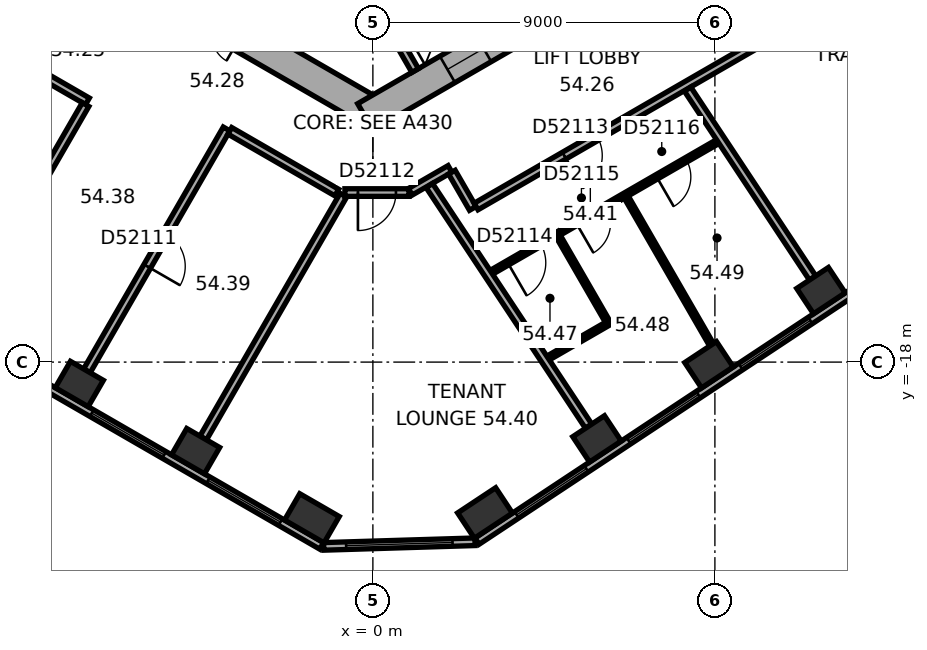
"""IFC4 building model, lengths in metres.
Left out: names, types, materials, properties, quantities, classifications, styles, units other than length and angle.
Written with IfcOpenShell. Run it as: python <this file> out.ifc"""

import sys

from ifc_helpers import new_model, si_unit, direction, frame, frame_2d, origin, origin_2d, place, context, subcontext, project, spatial, rectangle, extrude, element, fill, save


model = new_model("IFC4")
c1 = context("Model", 3, precision=1e-05, world=origin(), true_north=direction((0.0, 1.0)))
c2 = subcontext(c1, "Body", "Model", "MODEL_VIEW")
j1 = project(units=[si_unit("LENGTHUNIT", "METRE"), si_unit("PLANEANGLEUNIT", "RADIAN")], contexts=[c1])
p1 = place(None, origin())
s1 = spatial("IfcSite", under=j1, at=p1, CompositionType="ELEMENT")
p2 = place(p1, origin())
s2 = spatial("IfcBuilding", under=s1, at=p2, CompositionType="ELEMENT")
p3 = place(p2, frame((0.0, 0.0, 221.7)))
s3 = spatial("IfcBuildingStorey", under=s2, at=p3, CompositionType="ELEMENT", Elevation=221.7)
for number, where, z_axis, x_axis in (
    (1, (-7.725, -18.576, 0.0), (0.0, 0.0, 1.0), (0.866, -0.5, 0.0)),
    (2, (-4.665, -20.343, 0.0), (0.0, 0.0, 1.0), (0.866, -0.5, 0.0)),
):
    element("IfcColumn", number, at=place(p3, frame(where, z_axis=z_axis, x_axis=x_axis)), inside=s3, PredefinedType="COLUMN", context=c2, shape_type="SweptSolid", body=[
        extrude(rectangle(XDim=1.0, YDim=0.8, at=origin_2d()), origin(), (0.0, 0.0, 1.0), 3.7),
    ])
for number, where, z_axis, x_axis in (
    (3, (-1.604, -22.11, 0.0), (0.0, 0.0, 1.0), (0.866, -0.5, 0.0)),
    (4, (2.951, -21.971, 0.0), (0.0, 0.0, 1.0), (0.834, 0.552, 0.0)),
):
    element("IfcColumn", number, at=place(p3, frame(where, z_axis=z_axis, x_axis=x_axis)), inside=s3, PredefinedType="COLUMN", context=c2, shape_type="SweptSolid", body=[
        extrude(rectangle(XDim=1.2, YDim=0.8, at=origin_2d()), origin(), (0.0, 0.0, 1.0), 3.7),
    ])
for number, where, z_axis, x_axis in (
    (5, (5.898, -20.021, 0.0), (0.0, 0.0, 1.0), (0.834, 0.552, 0.0)),
    (6, (8.844, -18.07, 0.0), (0.0, 0.0, 1.0), (0.834, 0.552, 0.0)),
    (7, (11.791, -16.12, 0.0), (0.0, 0.0, 1.0), (0.834, 0.552, 0.0)),
):
    element("IfcColumn", number, at=place(p3, frame(where, z_axis=z_axis, x_axis=x_axis)), inside=s3, PredefinedType="COLUMN", context=c2, shape_type="SweptSolid", body=[
        extrude(rectangle(XDim=1.0, YDim=0.8, at=origin_2d()), origin(), (0.0, 0.0, 1.0), 3.7),
    ])
p4 = place(p3, frame((-10.1, -5.6, 0.0), z_axis=(0.0, 0.0, 1.0), x_axis=(0.866023897231, -0.500002609418, 0.0)))
e8 = element("IfcWall", 8, at=p4, inside=s3, PredefinedType="SHEAR", context=c2, shape_type="SweptSolid", body=[
    extrude(rectangle(XDim=11.894, YDim=0.8, at=frame_2d((5.947, 0.0))), origin(), (0.0, 0.0, 1.0), 3.7),
])
p5 = place(p4, frame((6.147, 0.0, 0.0)))
e9 = element("IfcOpeningElement", 9, at=p5, cuts=e8, PredefinedType="OPENING", context=c2, shape_type="SweptSolid", body=[
    extrude(rectangle(XDim=1.5, YDim=2.1, at=frame_2d((0.75, 1.05))), frame((0.0, 0.41, 0.0), z_axis=(0.0, -1.0, 0.0), x_axis=(1.0, 0.0, 0.0)), (0.0, 0.0, 1.0), 0.82),
])
p6 = place(p4, frame((1.597, 0.0, 0.0)))
e10 = element("IfcOpeningElement", 10, at=p6, cuts=e8, PredefinedType="OPENING", context=c2, shape_type="SweptSolid", body=[
    extrude(rectangle(XDim=1.1, YDim=2.1, at=frame_2d((0.55, 1.05))), frame((0.0, 0.41, 0.0), z_axis=(0.0, -1.0, 0.0), x_axis=(1.0, 0.0, 0.0)), (0.0, 0.0, 1.0), 0.82),
])
p7 = place(p4, frame((4.197, 0.0, 0.0)))
e11 = element("IfcOpeningElement", 11, at=p7, cuts=e8, PredefinedType="OPENING", context=c2, shape_type="SweptSolid", body=[
    extrude(rectangle(XDim=1.1, YDim=2.1, at=frame_2d((0.55, 1.05))), frame((0.0, 0.41, 0.0), z_axis=(0.0, -1.0, 0.0), x_axis=(1.0, 0.0, 0.0)), (0.0, 0.0, 1.0), 0.82),
])
p8 = place(p3, frame((-0.2, -11.547, 0.0), z_axis=(0.0, 0.0, 1.0), x_axis=(0.866023897231, 0.500002609418, 0.0)))
e12 = element("IfcWall", 12, at=p8, inside=s3, PredefinedType="SHEAR", context=c2, shape_type="SweptSolid", body=[
    extrude(rectangle(XDim=11.894, YDim=0.8, at=frame_2d((5.947, 0.0))), origin(), (0.0, 0.0, 1.0), 3.7),
])
p9 = place(p8, frame((2.497, 0.0, 0.0)))
e13 = element("IfcOpeningElement", 13, at=p9, cuts=e12, PredefinedType="OPENING", context=c2, shape_type="SweptSolid", body=[
    extrude(rectangle(XDim=1.1, YDim=2.1, at=frame_2d((0.55, 1.05))), frame((0.0, 0.41, 0.0), z_axis=(0.0, -1.0, 0.0), x_axis=(1.0, 0.0, 0.0)), (0.0, 0.0, 1.0), 0.82),
])
p10 = place(p8, frame((5.097, 0.0, 0.0)))
e14 = element("IfcOpeningElement", 14, at=p10, cuts=e12, PredefinedType="OPENING", context=c2, shape_type="SweptSolid", body=[
    extrude(rectangle(XDim=1.1, YDim=2.1, at=frame_2d((0.55, 1.05))), frame((0.0, 0.41, 0.0), z_axis=(0.0, -1.0, 0.0), x_axis=(1.0, 0.0, 0.0)), (0.0, 0.0, 1.0), 0.82),
])
p11 = place(p8, frame((7.697, 0.0, 0.0)))
e15 = element("IfcOpeningElement", 15, at=p11, cuts=e12, PredefinedType="OPENING", context=c2, shape_type="SweptSolid", body=[
    extrude(rectangle(XDim=1.1, YDim=2.1, at=frame_2d((0.55, 1.05))), frame((0.0, 0.41, 0.0), z_axis=(0.0, -1.0, 0.0), x_axis=(1.0, 0.0, 0.0)), (0.0, 0.0, 1.0), 0.82),
])
p12 = place(p3, frame((-17.664, -13.415, 0.0), z_axis=(0.0, 0.0, 1.0), x_axis=(0.866026555358, -0.49999800541, 0.0)))
e16 = element("IfcWall", 16, at=p12, inside=s3, PredefinedType="STANDARD", context=c2, shape_type="SweptSolid", body=[
    extrude(rectangle(XDim=18.841, YDim=0.2, at=frame_2d((9.421, 0.0))), origin(), (0.0, 0.0, 1.0), 3.7),
])
p13 = place(p12, frame((1.254, 0.0, 0.9)))
e17 = element("IfcOpeningElement", 17, at=p13, cuts=e16, PredefinedType="OPENING", context=c2, shape_type="SweptSolid", body=[
    extrude(rectangle(XDim=2.2, YDim=2.0, at=frame_2d((1.1, 1.0))), frame((0.0, 0.11, 0.0), z_axis=(0.0, -1.0, 0.0), x_axis=(1.0, 0.0, 0.0)), (0.0, 0.0, 1.0), 0.22),
])
p14 = place(p12, frame((4.788, 0.0, 0.9)))
e18 = element("IfcOpeningElement", 18, at=p14, cuts=e16, PredefinedType="OPENING", context=c2, shape_type="SweptSolid", body=[
    extrude(rectangle(XDim=2.2, YDim=2.0, at=frame_2d((1.1, 1.0))), frame((0.0, 0.11, 0.0), z_axis=(0.0, -1.0, 0.0), x_axis=(1.0, 0.0, 0.0)), (0.0, 0.0, 1.0), 0.22),
])
p15 = place(p12, frame((8.322, 0.0, 0.9)))
e19 = element("IfcOpeningElement", 19, at=p15, cuts=e16, PredefinedType="OPENING", context=c2, shape_type="SweptSolid", body=[
    extrude(rectangle(XDim=2.2, YDim=2.0, at=frame_2d((1.1, 1.0))), frame((0.0, 0.11, 0.0), z_axis=(0.0, -1.0, 0.0), x_axis=(1.0, 0.0, 0.0)), (0.0, 0.0, 1.0), 0.22),
])
p16 = place(p12, frame((11.855, 0.0, 0.9)))
e20 = element("IfcOpeningElement", 20, at=p16, cuts=e16, PredefinedType="OPENING", context=c2, shape_type="SweptSolid", body=[
    extrude(rectangle(XDim=2.2, YDim=2.0, at=frame_2d((1.1, 1.0))), frame((0.0, 0.11, 0.0), z_axis=(0.0, -1.0, 0.0), x_axis=(1.0, 0.0, 0.0)), (0.0, 0.0, 1.0), 0.22),
])
p17 = place(p12, frame((15.389, 0.0, 0.9)))
e21 = element("IfcOpeningElement", 21, at=p17, cuts=e16, PredefinedType="OPENING", context=c2, shape_type="SweptSolid", body=[
    extrude(rectangle(XDim=2.2, YDim=2.0, at=frame_2d((1.1, 1.0))), frame((0.0, 0.11, 0.0), z_axis=(0.0, -1.0, 0.0), x_axis=(1.0, 0.0, 0.0)), (0.0, 0.0, 1.0), 0.22),
])
p18 = place(p3, frame((-1.294, -22.849, 0.0), z_axis=(0.0, 0.0, 1.0), x_axis=(0.999533952558, 0.030526671678, 0.0)))
e22 = element("IfcWall", 22, at=p18, inside=s3, PredefinedType="STANDARD", context=c2, shape_type="SweptSolid", body=[
    extrude(rectangle(XDim=3.983, YDim=0.2, at=frame_2d((1.991, 0.0))), origin(), (0.0, 0.0, 1.0), 3.7),
])
p19 = place(p18, frame((0.591, 0.0, 0.9)))
e23 = element("IfcOpeningElement", 23, at=p19, cuts=e22, PredefinedType="OPENING", context=c2, shape_type="SweptSolid", body=[
    extrude(rectangle(XDim=2.8, YDim=2.0, at=frame_2d((1.4, 1.0))), frame((0.0, 0.11, 0.0), z_axis=(0.0, -1.0, 0.0), x_axis=(1.0, 0.0, 0.0)), (0.0, 0.0, 1.0), 0.22),
])
p20 = place(p3, frame((2.739, -22.711, 0.0), z_axis=(0.0, 0.0, 1.0), x_axis=(0.833885723098, 0.551937134838, 0.0)))
e24 = element("IfcWall", 24, at=p20, inside=s3, PredefinedType="STANDARD", context=c2, shape_type="SweptSolid", body=[
    extrude(rectangle(XDim=18.841, YDim=0.2, at=frame_2d((9.421, 0.0))), origin(), (0.0, 0.0, 1.0), 3.7),
])
p21 = place(p20, frame((1.252, 0.0, 0.9)))
e25 = element("IfcOpeningElement", 25, at=p21, cuts=e24, PredefinedType="OPENING", context=c2, shape_type="SweptSolid", body=[
    extrude(rectangle(XDim=2.2, YDim=2.0, at=frame_2d((1.1, 1.0))), frame((0.0, 0.11, 0.0), z_axis=(0.0, -1.0, 0.0), x_axis=(1.0, 0.0, 0.0)), (0.0, 0.0, 1.0), 0.22),
])
p22 = place(p20, frame((4.786, 0.0, 0.9)))
e26 = element("IfcOpeningElement", 26, at=p22, cuts=e24, PredefinedType="OPENING", context=c2, shape_type="SweptSolid", body=[
    extrude(rectangle(XDim=2.2, YDim=2.0, at=frame_2d((1.1, 1.0))), frame((0.0, 0.11, 0.0), z_axis=(0.0, -1.0, 0.0), x_axis=(1.0, 0.0, 0.0)), (0.0, 0.0, 1.0), 0.22),
])
p23 = place(p20, frame((8.32, 0.0, 0.9)))
e27 = element("IfcOpeningElement", 27, at=p23, cuts=e24, PredefinedType="OPENING", context=c2, shape_type="SweptSolid", body=[
    extrude(rectangle(XDim=2.2, YDim=2.0, at=frame_2d((1.1, 1.0))), frame((0.0, 0.11, 0.0), z_axis=(0.0, -1.0, 0.0), x_axis=(1.0, 0.0, 0.0)), (0.0, 0.0, 1.0), 0.22),
])
p24 = place(p20, frame((11.854, 0.0, 0.9)))
e28 = element("IfcOpeningElement", 28, at=p24, cuts=e24, PredefinedType="OPENING", context=c2, shape_type="SweptSolid", body=[
    extrude(rectangle(XDim=2.2, YDim=2.0, at=frame_2d((1.1, 1.0))), frame((0.0, 0.11, 0.0), z_axis=(0.0, -1.0, 0.0), x_axis=(1.0, 0.0, 0.0)), (0.0, 0.0, 1.0), 0.22),
])
p25 = place(p20, frame((15.387, 0.0, 0.9)))
e29 = element("IfcOpeningElement", 29, at=p25, cuts=e24, PredefinedType="OPENING", context=c2, shape_type="SweptSolid", body=[
    extrude(rectangle(XDim=2.2, YDim=2.0, at=frame_2d((1.1, 1.0))), frame((0.0, 0.11, 0.0), z_axis=(0.0, -1.0, 0.0), x_axis=(1.0, 0.0, 0.0)), (0.0, 0.0, 1.0), 0.22),
])
p26 = place(p3, frame((0.013, -8.422, 0.0), z_axis=(0.0, 0.0, 1.0), x_axis=(0.500077893725, -0.86598042715, 0.0)))
e30 = element("IfcWall", 30, at=p26, inside=s3, PredefinedType="PARTITIONING", context=c2, shape_type="SweptSolid", body=[
    extrude(rectangle(XDim=2.2, YDim=0.2, at=frame_2d((1.1, 0.0))), origin(), (0.0, 0.0, 1.0), 3.42),
])
p27 = place(p3, frame((-11.551, -8.805, 0.0), z_axis=(0.0, 0.0, 1.0), x_axis=(0.866038310922, -0.499977643516, 0.0)))
e31 = element("IfcWall", 31, at=p27, inside=s3, PredefinedType="PARTITIONING", context=c2, shape_type="SweptSolid", body=[
    extrude(rectangle(XDim=4.665, YDim=0.2, at=frame_2d((2.333, 0.0))), origin(), (0.0, 0.0, 1.0), 3.42),
])
p28 = place(p3, frame((-10.585, -16.463, 0.0), z_axis=(0.0, 0.0, 1.0), x_axis=(0.499993802756, 0.866028981735, 0.0)))
e32 = element("IfcWall", 32, at=p28, inside=s3, PredefinedType="PARTITIONING", context=c2, shape_type="SweptSolid", body=[
    extrude(rectangle(XDim=6.049, YDim=0.2, at=frame_2d((3.024, 0.0))), origin(), (0.0, 0.0, 1.0), 2.87),
])
p29 = place(p28, frame((2.524, 0.0, 0.0)))
e33 = element("IfcOpeningElement", 33, at=p29, cuts=e32, PredefinedType="OPENING", context=c2, shape_type="SweptSolid", body=[
    extrude(rectangle(XDim=1.0, YDim=2.1, at=frame_2d((0.5, 1.05))), frame((0.0, 0.11, 0.0), z_axis=(0.0, -1.0, 0.0), x_axis=(1.0, 0.0, 0.0)), (0.0, 0.0, 1.0), 0.22),
])
p30 = place(p3, frame((-7.525, -18.23, 0.0), z_axis=(0.0, 0.0, 1.0), x_axis=(0.499983153418, 0.866035129944, 0.0)))
e34 = element("IfcWall", 34, at=p30, inside=s3, PredefinedType="PARTITIONING", context=c2, shape_type="SweptSolid", body=[
    extrude(rectangle(XDim=7.35, YDim=0.2, at=frame_2d((3.675, 0.0))), origin(), (0.0, 0.0, 1.0), 3.42),
])
p31 = place(p30, frame((3.175, 0.0, 0.0)))
e35 = element("IfcOpeningElement", 35, at=p31, cuts=e34, PredefinedType="OPENING", context=c2, shape_type="SweptSolid", body=[
    extrude(rectangle(XDim=1.0, YDim=2.1, at=frame_2d((0.5, 1.05))), frame((0.0, 0.11, 0.0), z_axis=(0.0, -1.0, 0.0), x_axis=(1.0, 0.0, 0.0)), (0.0, 0.0, 1.0), 0.22),
])
p32 = place(p3, frame((-4.465, -19.997, 0.0), z_axis=(0.0, 0.0, 1.0), x_axis=(0.500011802906, 0.866018589266, 0.0)))
e36 = element("IfcWall", 36, at=p32, inside=s3, PredefinedType="PARTITIONING", context=c2, shape_type="SweptSolid", body=[
    extrude(rectangle(XDim=7.377, YDim=0.2, at=frame_2d((3.688, 0.0))), origin(), (0.0, 0.0, 1.0), 3.42),
])
p33 = place(p3, frame((-3.763, -11.915, 0.0), z_axis=(0.0, 0.0, 1.0), x_axis=(0.866037915695, -0.499978328108, 0.0)))
e37 = element("IfcWall", 37, at=p33, inside=s3, PredefinedType="PARTITIONING", context=c2, shape_type="SweptSolid", body=[
    extrude(rectangle(XDim=3.249, YDim=0.2, at=frame_2d((1.625, 0.0))), origin(), (0.0, 0.0, 1.0), 3.42),
])
p34 = place(p3, frame((-0.736, -13.539, 0.0), z_axis=(0.0, 0.0, 1.0), x_axis=(1.0, 0.0, 0.0)))
e38 = element("IfcWall", 38, at=p34, inside=s3, PredefinedType="PARTITIONING", context=c2, shape_type="SweptSolid", body=[
    extrude(rectangle(XDim=1.686, YDim=0.2, at=frame_2d((0.843, 0.0))), origin(), (0.0, 0.0, 1.0), 3.42),
])
p35 = place(p34, frame((0.343, 0.0, 0.0)))
e39 = element("IfcOpeningElement", 39, at=p35, cuts=e38, PredefinedType="OPENING", context=c2, shape_type="SweptSolid", body=[
    extrude(rectangle(XDim=1.0, YDim=2.1, at=frame_2d((0.5, 1.05))), frame((0.0, 0.11, 0.0), z_axis=(0.0, -1.0, 0.0), x_axis=(1.0, 0.0, 0.0)), (0.0, 0.0, 1.0), 0.22),
])
p36 = place(p3, frame((0.985, -13.519, 0.0), z_axis=(0.0, 0.0, 1.0), x_axis=(0.866054082991, 0.499950322867, 0.0)))
e40 = element("IfcWall", 40, at=p36, inside=s3, PredefinedType="PARTITIONING", context=c2, shape_type="SweptSolid", body=[
    extrude(rectangle(XDim=1.206, YDim=0.2, at=frame_2d((0.603, 0.0))), origin(), (0.0, 0.0, 1.0), 3.42),
])
p37 = place(p3, frame((2.079, -13.003, 0.0), z_axis=(0.0, 0.0, 1.0), x_axis=(0.500074377092, -0.865982457891, 0.0)))
e41 = element("IfcWall", 41, at=p37, inside=s3, PredefinedType="PARTITIONING", context=c2, shape_type="SweptSolid", body=[
    extrude(rectangle(XDim=1.101, YDim=0.2, at=frame_2d((0.55, 0.0))), origin(), (0.0, 0.0, 1.0), 3.42),
])
p38 = place(p3, frame((2.716, -13.906, 0.0), z_axis=(0.0, 0.0, 1.0), x_axis=(0.866040290674, 0.499974214264, 0.0)))
e42 = element("IfcWall", 42, at=p38, inside=s3, PredefinedType="PARTITIONING", context=c2, shape_type="SweptSolid", body=[
    extrude(rectangle(XDim=8.702, YDim=0.2, at=frame_2d((4.351, 0.0))), origin(), (0.0, 0.0, 1.0), 3.42),
])
p39 = place(p38, frame((2.679, 0.0, 0.0)))
e43 = element("IfcOpeningElement", 43, at=p39, cuts=e42, PredefinedType="OPENING", context=c2, shape_type="SweptSolid", body=[
    extrude(rectangle(XDim=1.0, YDim=2.1, at=frame_2d((0.5, 1.05))), frame((0.0, 0.11, 0.0), z_axis=(0.0, -1.0, 0.0), x_axis=(1.0, 0.0, 0.0)), (0.0, 0.0, 1.0), 0.22),
])
p40 = place(p3, frame((3.117, -15.638, 0.0), z_axis=(0.0, 0.0, 1.0), x_axis=(0.866031365477, 0.499989673903, 0.0)))
e44 = element("IfcWall", 44, at=p40, inside=s3, PredefinedType="PARTITIONING", context=c2, shape_type="SweptSolid", body=[
    extrude(rectangle(XDim=6.881, YDim=0.12, at=frame_2d((3.44, 0.0))), origin(), (0.0, 0.0, 1.0), 3.42),
])
p41 = place(p40, frame((0.5, 0.0, 0.0)))
e45 = element("IfcOpeningElement", 45, at=p41, cuts=e44, PredefinedType="OPENING", context=c2, shape_type="SweptSolid", body=[
    extrude(rectangle(XDim=1.0, YDim=2.1, at=frame_2d((0.5, 1.05))), frame((0.0, 0.07, 0.0), z_axis=(0.0, -1.0, 0.0), x_axis=(1.0, 0.0, 0.0)), (0.0, 0.0, 1.0), 0.14),
])
p42 = place(p40, frame((2.583, 0.0, 0.0)))
e46 = element("IfcOpeningElement", 46, at=p42, cuts=e44, PredefinedType="OPENING", context=c2, shape_type="SweptSolid", body=[
    extrude(rectangle(XDim=0.9, YDim=2.1, at=frame_2d((0.45, 1.05))), frame((0.0, 0.07, 0.0), z_axis=(0.0, -1.0, 0.0), x_axis=(1.0, 0.0, 0.0)), (0.0, 0.0, 1.0), 0.14),
])
p43 = place(p40, frame((5.023, 0.0, 0.0)))
e47 = element("IfcOpeningElement", 47, at=p43, cuts=e44, PredefinedType="OPENING", context=c2, shape_type="SweptSolid", body=[
    extrude(rectangle(XDim=0.9, YDim=2.1, at=frame_2d((0.45, 1.05))), frame((0.0, 0.07, 0.0), z_axis=(0.0, -1.0, 0.0), x_axis=(1.0, 0.0, 0.0)), (0.0, 0.0, 1.0), 0.14),
])
p44 = place(p3, frame((4.61, -17.893, 0.0), z_axis=(0.0, 0.0, 1.0), x_axis=(0.866023842607, 0.500002704028, 0.0)))
e48 = element("IfcWall", 48, at=p44, inside=s3, PredefinedType="PARTITIONING", context=c2, shape_type="SweptSolid", body=[
    extrude(rectangle(XDim=1.835, YDim=0.12, at=frame_2d((0.917, 0.0))), origin(), (0.0, 0.0, 1.0), 3.42),
])
p45 = place(p3, frame((5.677, -19.687, 0.0), z_axis=(0.0, 0.0, 1.0), x_axis=(-0.551936619203, 0.833886064389, 0.0)))
e49 = element("IfcWall", 49, at=p45, inside=s3, PredefinedType="PARTITIONING", context=c2, shape_type="SweptSolid", body=[
    extrude(rectangle(XDim=7.592, YDim=0.2, at=frame_2d((3.796, 0.0))), origin(), (0.0, 0.0, 1.0), 3.42),
])
p46 = place(p3, frame((6.169, -16.924, 0.0), z_axis=(0.0, 0.0, 1.0), x_axis=(-0.500047388771, 0.865998042136, 0.0)))
e50 = element("IfcWall", 50, at=p46, inside=s3, PredefinedType="PARTITIONING", context=c2, shape_type="SweptSolid", body=[
    extrude(rectangle(XDim=2.58, YDim=0.12, at=frame_2d((1.29, 0.0))), origin(), (0.0, 0.0, 1.0), 3.42),
])
p47 = place(p3, frame((8.912, -17.545, 0.0), z_axis=(0.0, 0.0, 1.0), x_axis=(-0.500022113525, 0.866012636158, 0.0)))
e51 = element("IfcWall", 51, at=p47, inside=s3, PredefinedType="PARTITIONING", context=c2, shape_type="SweptSolid", body=[
    extrude(rectangle(XDim=4.49, YDim=0.12, at=frame_2d((2.245, 0.0))), origin(), (0.0, 0.0, 1.0), 2.87),
])
p48 = place(p3, frame((11.571, -15.786, 0.0), z_axis=(0.0, 0.0, 1.0), x_axis=(-0.551944861763, 0.833880608705, 0.0)))
e52 = element("IfcWall", 52, at=p48, inside=s3, PredefinedType="PARTITIONING", context=c2, shape_type="SweptSolid", body=[
    extrude(rectangle(XDim=5.957, YDim=0.2, at=frame_2d((2.979, 0.0))), origin(), (0.0, 0.0, 1.0), 3.42),
])
p49 = place(p16, origin())
e53 = element("IfcWindow", 53, at=p49, inside=s3, PartitioningType="SINGLE_PANEL", PredefinedType="WINDOW", context=c2, shape_type="SweptSolid", body=[
    extrude(rectangle(XDim=2.2, YDim=2.0, at=frame_2d((1.1, 1.0))), frame((0.0, 0.03, 0.0), z_axis=(0.0, -1.0, 0.0), x_axis=(1.0, 0.0, 0.0)), (0.0, 0.0, 1.0), 0.06),
])
fill(e20, e53)
p50 = place(p17, origin())
e54 = element("IfcWindow", 54, at=p50, inside=s3, PartitioningType="SINGLE_PANEL", PredefinedType="WINDOW", context=c2, shape_type="SweptSolid", body=[
    extrude(rectangle(XDim=2.2, YDim=2.0, at=frame_2d((1.1, 1.0))), frame((0.0, 0.03, 0.0), z_axis=(0.0, -1.0, 0.0), x_axis=(1.0, 0.0, 0.0)), (0.0, 0.0, 1.0), 0.06),
])
fill(e21, e54)
p51 = place(p19, origin())
e55 = element("IfcWindow", 55, at=p51, inside=s3, PartitioningType="SINGLE_PANEL", PredefinedType="WINDOW", context=c2, shape_type="SweptSolid", body=[
    extrude(rectangle(XDim=2.8, YDim=2.0, at=frame_2d((1.4, 1.0))), frame((0.0, 0.03, 0.0), z_axis=(0.0, -1.0, 0.0), x_axis=(1.0, 0.0, 0.0)), (0.0, 0.0, 1.0), 0.06),
])
fill(e23, e55)
p52 = place(p21, origin())
e56 = element("IfcWindow", 56, at=p52, inside=s3, PartitioningType="SINGLE_PANEL", PredefinedType="WINDOW", context=c2, shape_type="SweptSolid", body=[
    extrude(rectangle(XDim=2.2, YDim=2.0, at=frame_2d((1.1, 1.0))), frame((0.0, 0.03, 0.0), z_axis=(0.0, -1.0, 0.0), x_axis=(1.0, 0.0, 0.0)), (0.0, 0.0, 1.0), 0.06),
])
fill(e25, e56)
p53 = place(p22, origin())
e57 = element("IfcWindow", 57, at=p53, inside=s3, PartitioningType="SINGLE_PANEL", PredefinedType="WINDOW", context=c2, shape_type="SweptSolid", body=[
    extrude(rectangle(XDim=2.2, YDim=2.0, at=frame_2d((1.1, 1.0))), frame((0.0, 0.03, 0.0), z_axis=(0.0, -1.0, 0.0), x_axis=(1.0, 0.0, 0.0)), (0.0, 0.0, 1.0), 0.06),
])
fill(e26, e57)
p54 = place(p23, origin())
e58 = element("IfcWindow", 58, at=p54, inside=s3, PartitioningType="SINGLE_PANEL", PredefinedType="WINDOW", context=c2, shape_type="SweptSolid", body=[
    extrude(rectangle(XDim=2.2, YDim=2.0, at=frame_2d((1.1, 1.0))), frame((0.0, 0.03, 0.0), z_axis=(0.0, -1.0, 0.0), x_axis=(1.0, 0.0, 0.0)), (0.0, 0.0, 1.0), 0.06),
])
fill(e27, e58)
p55 = place(p9, origin())
e59 = element("IfcDoor", 59, at=p55, inside=s3, OperationType="DOUBLE_DOOR_SLIDING", PredefinedType="DOOR", context=c2, shape_type="SweptSolid", body=[
    extrude(rectangle(XDim=1.1, YDim=2.1, at=frame_2d((0.55, 1.05))), frame((0.0, 0.025, 0.0), z_axis=(0.0, -1.0, 0.0), x_axis=(1.0, 0.0, 0.0)), (0.0, 0.0, 1.0), 0.05),
])
fill(e13, e59)
p56 = place(p31, origin())
e60 = element("IfcDoor", 60, at=p56, inside=s3, OperationType="SINGLE_SWING_LEFT", PredefinedType="DOOR", context=c2, shape_type="SweptSolid", body=[
    extrude(rectangle(XDim=1.0, YDim=2.1, at=frame_2d((0.5, 1.05))), frame((0.0, 0.025, 0.0), z_axis=(0.0, -1.0, 0.0), x_axis=(1.0, 0.0, 0.0)), (0.0, 0.0, 1.0), 0.05),
])
fill(e35, e60)
p57 = place(p35, origin())
e61 = element("IfcDoor", 61, at=p57, inside=s3, OperationType="SINGLE_SWING_LEFT", PredefinedType="DOOR", context=c2, shape_type="SweptSolid", body=[
    extrude(rectangle(XDim=1.0, YDim=2.1, at=frame_2d((0.5, 1.05))), frame((0.0, 0.025, 0.0), z_axis=(0.0, -1.0, 0.0), x_axis=(1.0, 0.0, 0.0)), (0.0, 0.0, 1.0), 0.05),
])
fill(e39, e61)
p58 = place(p39, origin())
e62 = element("IfcDoor", 62, at=p58, inside=s3, OperationType="SINGLE_SWING_LEFT", PredefinedType="DOOR", context=c2, shape_type="SweptSolid", body=[
    extrude(rectangle(XDim=1.0, YDim=2.1, at=frame_2d((0.5, 1.05))), frame((0.0, 0.025, 0.0), z_axis=(0.0, -1.0, 0.0), x_axis=(1.0, 0.0, 0.0)), (0.0, 0.0, 1.0), 0.05),
])
fill(e43, e62)
p59 = place(p41, origin())
e63 = element("IfcDoor", 63, at=p59, inside=s3, OperationType="SINGLE_SWING_LEFT", PredefinedType="DOOR", context=c2, shape_type="SweptSolid", body=[
    extrude(rectangle(XDim=1.0, YDim=2.1, at=frame_2d((0.5, 1.05))), frame((0.0, 0.025, 0.0), z_axis=(0.0, -1.0, 0.0), x_axis=(1.0, 0.0, 0.0)), (0.0, 0.0, 1.0), 0.05),
])
fill(e45, e63)
p60 = place(p42, origin())
e64 = element("IfcDoor", 64, at=p60, inside=s3, OperationType="SINGLE_SWING_LEFT", PredefinedType="DOOR", context=c2, shape_type="SweptSolid", body=[
    extrude(rectangle(XDim=0.9, YDim=2.1, at=frame_2d((0.45, 1.05))), frame((0.0, 0.025, 0.0), z_axis=(0.0, -1.0, 0.0), x_axis=(1.0, 0.0, 0.0)), (0.0, 0.0, 1.0), 0.05),
])
fill(e46, e64)
p61 = place(p43, origin())
e65 = element("IfcDoor", 65, at=p61, inside=s3, OperationType="SINGLE_SWING_LEFT", PredefinedType="DOOR", context=c2, shape_type="SweptSolid", body=[
    extrude(rectangle(XDim=0.9, YDim=2.1, at=frame_2d((0.45, 1.05))), frame((0.0, 0.025, 0.0), z_axis=(0.0, -1.0, 0.0), x_axis=(1.0, 0.0, 0.0)), (0.0, 0.0, 1.0), 0.05),
])
fill(e47, e65)
save(model, sys.argv[1])
